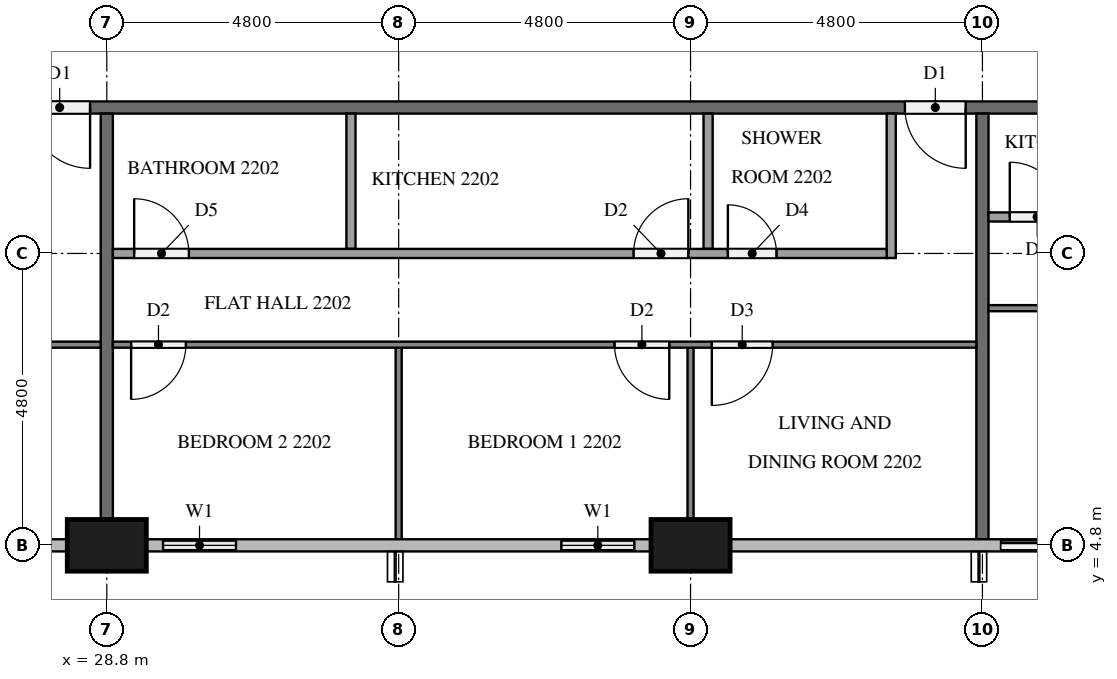
"""IFC4 building model, lengths in metres.
Left out: names, types, materials, properties, quantities, classifications, styles, units other than length and angle.
Written with IfcOpenShell. Run it as: python <this file> out.ifc"""

import sys

from ifc_helpers import new_model, si_unit, direction, frame, frame_2d, origin, origin_2d, place, context, subcontext, project, spatial, rectangle, extrude, element, fill, save


model = new_model("IFC4")
c1 = context("Model", 3, precision=1e-05, world=origin(), true_north=direction((0.0, 1.0)))
c2 = subcontext(c1, "Body", "Model", "MODEL_VIEW")
j1 = project(units=[si_unit("LENGTHUNIT", "METRE"), si_unit("PLANEANGLEUNIT", "RADIAN")], contexts=[c1])
p1 = place(None, origin())
s1 = spatial("IfcSite", under=j1, at=p1, CompositionType="ELEMENT")
p2 = place(p1, origin())
s2 = spatial("IfcBuilding", under=s1, at=p2, CompositionType="ELEMENT")
p3 = place(p2, frame((0.0, 0.0, 89.2)))
s3 = spatial("IfcBuildingStorey", under=s2, at=p3, CompositionType="ELEMENT", Elevation=89.2)
for number, where, z_axis, x_axis in (
    (1, (28.8, 4.8, 0.0), (0.0, 0.0, 1.0), (1.0, 0.0, 0.0)),
    (2, (38.4, 4.8, 0.0), (0.0, 0.0, 1.0), (1.0, 0.0, 0.0)),
):
    element("IfcColumn", number, at=place(p3, frame(where, z_axis=z_axis, x_axis=x_axis)), inside=s3, PredefinedType="COLUMN", context=c2, shape_type="SweptSolid", body=[
        extrude(rectangle(XDim=1.3, YDim=0.85, at=origin_2d()), origin(), (0.0, 0.0, 1.0), 3.2),
    ])
p4 = place(p3, frame((26.4, 4.8, 0.0), z_axis=(0.0, 0.0, 1.0), x_axis=(1.0, 0.0, 0.0)))
e3 = element("IfcWall", 3, at=p4, inside=s3, PredefinedType="SOLIDWALL", context=c2, shape_type="SweptSolid", body=[
    extrude(rectangle(XDim=1.75, YDim=0.15, at=frame_2d((0.875, 0.0))), origin(), (0.0, 0.0, 1.0), 3.2),
])
p5 = place(p4, frame((0.275, 0.0, 0.9)))
e4 = element("IfcOpeningElement", 4, at=p5, cuts=e3, PredefinedType="OPENING", context=c2, shape_type="SweptSolid", body=[
    extrude(rectangle(XDim=1.2, YDim=1.4, at=frame_2d((0.6, 0.7))), frame((0.0, 0.085, 0.0), z_axis=(0.0, -1.0, 0.0), x_axis=(1.0, 0.0, 0.0)), (0.0, 0.0, 1.0), 0.17),
])
p6 = place(p3, frame((29.45, 4.8, 0.0), z_axis=(0.0, 0.0, 1.0), x_axis=(1.0, 0.0, 0.0)))
e5 = element("IfcWall", 5, at=p6, inside=s3, PredefinedType="SOLIDWALL", context=c2, shape_type="SweptSolid", body=[
    extrude(rectangle(XDim=1.75, YDim=0.15, at=frame_2d((0.875, 0.0))), origin(), (0.0, 0.0, 1.0), 3.2),
])
p7 = place(p6, frame((0.275, 0.0, 0.9)))
e6 = element("IfcOpeningElement", 6, at=p7, cuts=e5, PredefinedType="OPENING", context=c2, shape_type="SweptSolid", body=[
    extrude(rectangle(XDim=1.2, YDim=1.4, at=frame_2d((0.6, 0.7))), frame((0.0, 0.085, 0.0), z_axis=(0.0, -1.0, 0.0), x_axis=(1.0, 0.0, 0.0)), (0.0, 0.0, 1.0), 0.17),
])
p8 = place(p3, frame((36.0, 4.8, 0.0), z_axis=(0.0, 0.0, 1.0), x_axis=(1.0, 0.0, 0.0)))
e7 = element("IfcWall", 7, at=p8, inside=s3, PredefinedType="SOLIDWALL", context=c2, shape_type="SweptSolid", body=[
    extrude(rectangle(XDim=1.75, YDim=0.15, at=frame_2d((0.875, 0.0))), origin(), (0.0, 0.0, 1.0), 3.2),
])
p9 = place(p8, frame((0.275, 0.0, 0.9)))
e8 = element("IfcOpeningElement", 8, at=p9, cuts=e7, PredefinedType="OPENING", context=c2, shape_type="SweptSolid", body=[
    extrude(rectangle(XDim=1.2, YDim=1.4, at=frame_2d((0.6, 0.7))), frame((0.0, 0.085, 0.0), z_axis=(0.0, -1.0, 0.0), x_axis=(1.0, 0.0, 0.0)), (0.0, 0.0, 1.0), 0.17),
])
p10 = place(p3, frame((43.2, 4.8, 0.0), z_axis=(0.0, 0.0, 1.0), x_axis=(1.0, 0.0, 0.0)))
e9 = element("IfcWall", 9, at=p10, inside=s3, PredefinedType="SOLIDWALL", context=c2, shape_type="SweptSolid", body=[
    extrude(rectangle(XDim=2.4, YDim=0.15, at=frame_2d((1.2, 0.0))), origin(), (0.0, 0.0, 1.0), 3.2),
])
p11 = place(p10, frame((0.3, 0.0, 0.0)))
e10 = element("IfcOpeningElement", 10, at=p11, cuts=e9, PredefinedType="OPENING", context=c2, shape_type="SweptSolid", body=[
    extrude(rectangle(XDim=1.8, YDim=2.4, at=frame_2d((0.9, 1.2))), frame((0.0, 0.085, 0.0), z_axis=(0.0, -1.0, 0.0), x_axis=(1.0, 0.0, 0.0)), (0.0, 0.0, 1.0), 0.17),
])
p12 = place(p3, frame((50.5, 12.0, 0.0), z_axis=(0.0, 0.0, 1.0), x_axis=(-1.0, 0.0, 0.0)))
e11 = element("IfcWall", 11, at=p12, inside=s3, PredefinedType="PARTITIONING", context=c2, shape_type="SweptSolid", body=[
    extrude(rectangle(XDim=38.6, YDim=0.2, at=frame_2d((19.3, 0.0))), origin(), (0.0, 0.0, 1.0), 3.2),
])
p13 = place(p12, frame((21.975, 0.0, 0.0)))
e12 = element("IfcOpeningElement", 12, at=p13, cuts=e11, PredefinedType="OPENING", context=c2, shape_type="SweptSolid", body=[
    extrude(rectangle(XDim=1.0, YDim=2.1, at=frame_2d((0.5, 1.05))), frame((0.0, 0.11, 0.0), z_axis=(0.0, -1.0, 0.0), x_axis=(1.0, 0.0, 0.0)), (0.0, 0.0, 1.0), 0.22),
])
p14 = place(p12, frame((7.575, 0.0, 0.0)))
e13 = element("IfcOpeningElement", 13, at=p14, cuts=e11, PredefinedType="OPENING", context=c2, shape_type="SweptSolid", body=[
    extrude(rectangle(XDim=1.0, YDim=2.1, at=frame_2d((0.5, 1.05))), frame((0.0, 0.11, 0.0), z_axis=(0.0, -1.0, 0.0), x_axis=(1.0, 0.0, 0.0)), (0.0, 0.0, 1.0), 0.22),
])
p15 = place(p12, frame((0.375, 0.0, 0.0)))
e14 = element("IfcOpeningElement", 14, at=p15, cuts=e11, PredefinedType="OPENING", context=c2, shape_type="SweptSolid", body=[
    extrude(rectangle(XDim=1.0, YDim=2.1, at=frame_2d((0.5, 1.05))), frame((0.0, 0.11, 0.0), z_axis=(0.0, -1.0, 0.0), x_axis=(1.0, 0.0, 0.0)), (0.0, 0.0, 1.0), 0.22),
])
p16 = place(p3, frame((28.8, 11.9, 0.0), z_axis=(0.0, 0.0, 1.0), x_axis=(0.0, -1.0, 0.0)))
e15 = element("IfcWall", 15, at=p16, inside=s3, PredefinedType="PARTITIONING", context=c2, shape_type="SweptSolid", body=[
    extrude(rectangle(XDim=6.675, YDim=0.2, at=frame_2d((3.337, 0.0))), origin(), (0.0, 0.0, 1.0), 3.2),
])
p17 = place(p3, frame((43.2, 11.9, 0.0), z_axis=(0.0, 0.0, 1.0), x_axis=(0.0, -1.0, 0.0)))
e16 = element("IfcWall", 16, at=p17, inside=s3, PredefinedType="PARTITIONING", context=c2, shape_type="SweptSolid", body=[
    extrude(rectangle(XDim=7.0, YDim=0.2, at=frame_2d((3.5, 0.0))), origin(), (0.0, 0.0, 1.0), 3.2),
])
p18 = place(p3, frame((28.7, 8.1, 0.0), z_axis=(0.0, 0.0, 1.0), x_axis=(-1.0, 0.0, 0.0)))
e17 = element("IfcWall", 17, at=p18, inside=s3, PredefinedType="PARTITIONING", context=c2, shape_type="SweptSolid", body=[
    extrude(rectangle(XDim=16.6, YDim=0.1, at=frame_2d((8.3, 0.0))), origin(), (0.0, 0.0, 1.0), 3.2),
])
p19 = place(p18, frame((3.45, 0.0, 0.0)))
e18 = element("IfcOpeningElement", 18, at=p19, cuts=e17, PredefinedType="OPENING", context=c2, shape_type="SweptSolid", body=[
    extrude(rectangle(XDim=0.9, YDim=2.1, at=frame_2d((0.45, 1.05))), frame((0.0, 0.06, 0.0), z_axis=(0.0, -1.0, 0.0), x_axis=(1.0, 0.0, 0.0)), (0.0, 0.0, 1.0), 0.12),
])
p20 = place(p18, frame((5.05, 0.0, 0.0)))
e19 = element("IfcOpeningElement", 19, at=p20, cuts=e17, PredefinedType="OPENING", context=c2, shape_type="SweptSolid", body=[
    extrude(rectangle(XDim=1.0, YDim=2.1, at=frame_2d((0.5, 1.05))), frame((0.0, 0.06, 0.0), z_axis=(0.0, -1.0, 0.0), x_axis=(1.0, 0.0, 0.0)), (0.0, 0.0, 1.0), 0.12),
])
p21 = place(p18, frame((15.4, 0.0, 0.0)))
e20 = element("IfcOpeningElement", 20, at=p21, cuts=e17, PredefinedType="OPENING", context=c2, shape_type="SweptSolid", body=[
    extrude(rectangle(XDim=0.9, YDim=2.1, at=frame_2d((0.45, 1.05))), frame((0.0, 0.06, 0.0), z_axis=(0.0, -1.0, 0.0), x_axis=(1.0, 0.0, 0.0)), (0.0, 0.0, 1.0), 0.12),
])
p22 = place(p3, frame((38.4, 8.05, 0.0), z_axis=(0.0, 0.0, 1.0), x_axis=(0.0, -1.0, 0.0)))
e21 = element("IfcWall", 21, at=p22, inside=s3, PredefinedType="PARTITIONING", context=c2, shape_type="SweptSolid", body=[
    extrude(rectangle(XDim=2.825, YDim=0.1, at=frame_2d((1.413, 0.0))), origin(), (0.0, 0.0, 1.0), 3.2),
])
p23 = place(p3, frame((33.6, 8.05, 0.0), z_axis=(0.0, 0.0, 1.0), x_axis=(0.0, -1.0, 0.0)))
e22 = element("IfcWall", 22, at=p23, inside=s3, PredefinedType="PARTITIONING", context=c2, shape_type="SweptSolid", body=[
    extrude(rectangle(XDim=3.15, YDim=0.1, at=frame_2d((1.575, 0.0))), origin(), (0.0, 0.0, 1.0), 3.2),
])
p24 = place(p3, frame((43.1, 8.1, 0.0), z_axis=(0.0, 0.0, 1.0), x_axis=(-1.0, 0.0, 0.0)))
e23 = element("IfcWall", 23, at=p24, inside=s3, PredefinedType="PARTITIONING", context=c2, shape_type="SweptSolid", body=[
    extrude(rectangle(XDim=14.2, YDim=0.1, at=frame_2d((7.1, 0.0))), origin(), (0.0, 0.0, 1.0), 3.2),
])
p25 = place(p24, frame((3.35, 0.0, 0.0)))
e24 = element("IfcOpeningElement", 24, at=p25, cuts=e23, PredefinedType="OPENING", context=c2, shape_type="SweptSolid", body=[
    extrude(rectangle(XDim=1.0, YDim=2.1, at=frame_2d((0.5, 1.05))), frame((0.0, 0.06, 0.0), z_axis=(0.0, -1.0, 0.0), x_axis=(1.0, 0.0, 0.0)), (0.0, 0.0, 1.0), 0.12),
])
p26 = place(p24, frame((5.05, 0.0, 0.0)))
e25 = element("IfcOpeningElement", 25, at=p26, cuts=e23, PredefinedType="OPENING", context=c2, shape_type="SweptSolid", body=[
    extrude(rectangle(XDim=0.9, YDim=2.1, at=frame_2d((0.45, 1.05))), frame((0.0, 0.06, 0.0), z_axis=(0.0, -1.0, 0.0), x_axis=(1.0, 0.0, 0.0)), (0.0, 0.0, 1.0), 0.12),
])
p27 = place(p24, frame((13.0, 0.0, 0.0)))
e26 = element("IfcOpeningElement", 26, at=p27, cuts=e23, PredefinedType="OPENING", context=c2, shape_type="SweptSolid", body=[
    extrude(rectangle(XDim=0.9, YDim=2.1, at=frame_2d((0.45, 1.05))), frame((0.0, 0.06, 0.0), z_axis=(0.0, -1.0, 0.0), x_axis=(1.0, 0.0, 0.0)), (0.0, 0.0, 1.0), 0.12),
])
for number, where, z_axis, x_axis in (
    (27, (38.688, 11.9, 0.0), (0.0, 0.0, 1.0), (0.0, -1.0, 0.0)),
    (28, (32.815, 11.9, 0.0), (0.0, 0.0, 1.0), (0.0, -1.0, 0.0)),
):
    element("IfcWall", number, at=place(p3, frame(where, z_axis=z_axis, x_axis=x_axis)), inside=s3, PredefinedType="PARTITIONING", context=c2, shape_type="SweptSolid", body=[
        extrude(rectangle(XDim=2.225, YDim=0.15, at=frame_2d((1.112, 0.0))), origin(), (0.0, 0.0, 1.0), 3.2),
    ])
p28 = place(p3, frame((41.7, 11.9, 0.0), z_axis=(0.0, 0.0, 1.0), x_axis=(0.0, -1.0, 0.0)))
e29 = element("IfcWall", 29, at=p28, inside=s3, PredefinedType="PARTITIONING", context=c2, shape_type="SweptSolid", body=[
    extrude(rectangle(XDim=2.375, YDim=0.15, at=frame_2d((1.188, 0.0))), origin(), (0.0, 0.0, 1.0), 3.2),
])
p29 = place(p3, frame((28.9, 9.6, 0.0), z_axis=(0.0, 0.0, 1.0), x_axis=(1.0, 0.0, 0.0)))
e30 = element("IfcWall", 30, at=p29, inside=s3, PredefinedType="PARTITIONING", context=c2, shape_type="SweptSolid", body=[
    extrude(rectangle(XDim=12.725, YDim=0.15, at=frame_2d((6.363, 0.0))), origin(), (0.0, 0.0, 1.0), 3.2),
])
p30 = place(p29, frame((10.114, 0.0, 0.0)))
e31 = element("IfcOpeningElement", 31, at=p30, cuts=e30, PredefinedType="OPENING", context=c2, shape_type="SweptSolid", body=[
    extrude(rectangle(XDim=0.8, YDim=2.1, at=frame_2d((0.4, 1.05))), frame((0.0, 0.085, 0.0), z_axis=(0.0, -1.0, 0.0), x_axis=(1.0, 0.0, 0.0)), (0.0, 0.0, 1.0), 0.17),
])
p31 = place(p29, frame((8.563, 0.0, 0.0)))
e32 = element("IfcOpeningElement", 32, at=p31, cuts=e30, PredefinedType="OPENING", context=c2, shape_type="SweptSolid", body=[
    extrude(rectangle(XDim=0.9, YDim=2.1, at=frame_2d((0.45, 1.05))), frame((0.0, 0.085, 0.0), z_axis=(0.0, -1.0, 0.0), x_axis=(1.0, 0.0, 0.0)), (0.0, 0.0, 1.0), 0.17),
])
p32 = place(p29, frame((0.35, 0.0, 0.0)))
e33 = element("IfcOpeningElement", 33, at=p32, cuts=e30, PredefinedType="OPENING", context=c2, shape_type="SweptSolid", body=[
    extrude(rectangle(XDim=0.9, YDim=2.1, at=frame_2d((0.45, 1.05))), frame((0.0, 0.085, 0.0), z_axis=(0.0, -1.0, 0.0), x_axis=(1.0, 0.0, 0.0)), (0.0, 0.0, 1.0), 0.17),
])
p33 = place(p3, frame((50.3, 8.7, 0.0), z_axis=(0.0, 0.0, 1.0), x_axis=(-1.0, 0.0, 0.0)))
e34 = element("IfcWall", 34, at=p33, inside=s3, PredefinedType="PARTITIONING", context=c2, shape_type="SweptSolid", body=[
    extrude(rectangle(XDim=7.0, YDim=0.1, at=frame_2d((3.5, 0.0))), origin(), (0.0, 0.0, 1.0), 3.2),
])
p34 = place(p33, frame((0.3, 0.0, 0.0)))
e35 = element("IfcOpeningElement", 35, at=p34, cuts=e34, PredefinedType="OPENING", context=c2, shape_type="SweptSolid", body=[
    extrude(rectangle(XDim=1.0, YDim=2.1, at=frame_2d((0.5, 1.05))), frame((0.0, 0.06, 0.0), z_axis=(0.0, -1.0, 0.0), x_axis=(1.0, 0.0, 0.0)), (0.0, 0.0, 1.0), 0.12),
])
p35 = place(p3, frame((43.3, 10.2, 0.0), z_axis=(0.0, 0.0, 1.0), x_axis=(1.0, 0.0, 0.0)))
e36 = element("IfcWall", 36, at=p35, inside=s3, PredefinedType="PARTITIONING", context=c2, shape_type="SweptSolid", body=[
    extrude(rectangle(XDim=5.525, YDim=0.15, at=frame_2d((2.762, 0.0))), origin(), (0.0, 0.0, 1.0), 3.2),
])
p36 = place(p35, frame((4.425, 0.0, 0.0)))
e37 = element("IfcOpeningElement", 37, at=p36, cuts=e36, PredefinedType="OPENING", context=c2, shape_type="SweptSolid", body=[
    extrude(rectangle(XDim=0.8, YDim=2.1, at=frame_2d((0.4, 1.05))), frame((0.0, 0.085, 0.0), z_axis=(0.0, -1.0, 0.0), x_axis=(1.0, 0.0, 0.0)), (0.0, 0.0, 1.0), 0.17),
])
p37 = place(p35, frame((0.35, 0.0, 0.0)))
e38 = element("IfcOpeningElement", 38, at=p37, cuts=e36, PredefinedType="OPENING", context=c2, shape_type="SweptSolid", body=[
    extrude(rectangle(XDim=0.9, YDim=2.1, at=frame_2d((0.45, 1.05))), frame((0.0, 0.085, 0.0), z_axis=(0.0, -1.0, 0.0), x_axis=(1.0, 0.0, 0.0)), (0.0, 0.0, 1.0), 0.17),
])
p38 = place(p7, origin())
e39 = element("IfcWindow", 39, at=p38, inside=s3, PartitioningType="SINGLE_PANEL", PredefinedType="WINDOW", context=c2, shape_type="SweptSolid", body=[
    extrude(rectangle(XDim=1.2, YDim=1.4, at=frame_2d((0.6, 0.7))), frame((0.0, 0.03, 0.0), z_axis=(0.0, -1.0, 0.0), x_axis=(1.0, 0.0, 0.0)), (0.0, 0.0, 1.0), 0.06),
])
fill(e6, e39)
p39 = place(p9, origin())
e40 = element("IfcWindow", 40, at=p39, inside=s3, PartitioningType="SINGLE_PANEL", PredefinedType="WINDOW", context=c2, shape_type="SweptSolid", body=[
    extrude(rectangle(XDim=1.2, YDim=1.4, at=frame_2d((0.6, 0.7))), frame((0.0, 0.03, 0.0), z_axis=(0.0, -1.0, 0.0), x_axis=(1.0, 0.0, 0.0)), (0.0, 0.0, 1.0), 0.06),
])
fill(e8, e40)
p40 = place(p11, origin())
e41 = element("IfcDoor", 41, at=p40, inside=s3, OperationType="SLIDING_TO_LEFT", PredefinedType="DOOR", context=c2, shape_type="SweptSolid", body=[
    extrude(rectangle(XDim=1.8, YDim=2.4, at=frame_2d((0.9, 1.2))), frame((0.0, 0.025, 0.0), z_axis=(0.0, -1.0, 0.0), x_axis=(1.0, 0.0, 0.0)), (0.0, 0.0, 1.0), 0.05),
])
fill(e10, e41)
p41 = place(p13, origin())
e42 = element("IfcDoor", 42, at=p41, inside=s3, OperationType="SINGLE_SWING_LEFT", PredefinedType="DOOR", context=c2, shape_type="SweptSolid", body=[
    extrude(rectangle(XDim=1.0, YDim=2.1, at=frame_2d((0.5, 1.05))), frame((0.0, 0.025, 0.0), z_axis=(0.0, -1.0, 0.0), x_axis=(1.0, 0.0, 0.0)), (0.0, 0.0, 1.0), 0.05),
])
fill(e12, e42)
p42 = place(p14, origin())
e43 = element("IfcDoor", 43, at=p42, inside=s3, OperationType="SINGLE_SWING_LEFT", PredefinedType="DOOR", context=c2, shape_type="SweptSolid", body=[
    extrude(rectangle(XDim=1.0, YDim=2.1, at=frame_2d((0.5, 1.05))), frame((0.0, 0.025, 0.0), z_axis=(0.0, -1.0, 0.0), x_axis=(1.0, 0.0, 0.0)), (0.0, 0.0, 1.0), 0.05),
])
fill(e13, e43)
p43 = place(p25, origin())
e44 = element("IfcDoor", 44, at=p43, inside=s3, OperationType="SINGLE_SWING_RIGHT", PredefinedType="DOOR", context=c2, shape_type="SweptSolid", body=[
    extrude(rectangle(XDim=1.0, YDim=2.1, at=frame_2d((0.5, 1.05))), frame((0.0, 0.025, 0.0), z_axis=(0.0, -1.0, 0.0), x_axis=(1.0, 0.0, 0.0)), (0.0, 0.0, 1.0), 0.05),
])
fill(e24, e44)
p44 = place(p26, origin())
e45 = element("IfcDoor", 45, at=p44, inside=s3, OperationType="SINGLE_SWING_LEFT", PredefinedType="DOOR", context=c2, shape_type="SweptSolid", body=[
    extrude(rectangle(XDim=0.9, YDim=2.1, at=frame_2d((0.45, 1.05))), frame((0.0, 0.025, 0.0), z_axis=(0.0, -1.0, 0.0), x_axis=(1.0, 0.0, 0.0)), (0.0, 0.0, 1.0), 0.05),
])
fill(e25, e45)
p45 = place(p27, origin())
e46 = element("IfcDoor", 46, at=p45, inside=s3, OperationType="SINGLE_SWING_RIGHT", PredefinedType="DOOR", context=c2, shape_type="SweptSolid", body=[
    extrude(rectangle(XDim=0.9, YDim=2.1, at=frame_2d((0.45, 1.05))), frame((0.0, 0.025, 0.0), z_axis=(0.0, -1.0, 0.0), x_axis=(1.0, 0.0, 0.0)), (0.0, 0.0, 1.0), 0.05),
])
fill(e26, e46)
p46 = place(p30, origin())
e47 = element("IfcDoor", 47, at=p46, inside=s3, OperationType="SINGLE_SWING_LEFT", PredefinedType="DOOR", context=c2, shape_type="SweptSolid", body=[
    extrude(rectangle(XDim=0.8, YDim=2.1, at=frame_2d((0.4, 1.05))), frame((0.0, 0.025, 0.0), z_axis=(0.0, -1.0, 0.0), x_axis=(1.0, 0.0, 0.0)), (0.0, 0.0, 1.0), 0.05),
])
fill(e31, e47)
p47 = place(p31, origin())
e48 = element("IfcDoor", 48, at=p47, inside=s3, OperationType="SINGLE_SWING_RIGHT", PredefinedType="DOOR", context=c2, shape_type="SweptSolid", body=[
    extrude(rectangle(XDim=0.9, YDim=2.1, at=frame_2d((0.45, 1.05))), frame((0.0, 0.025, 0.0), z_axis=(0.0, -1.0, 0.0), x_axis=(1.0, 0.0, 0.0)), (0.0, 0.0, 1.0), 0.05),
])
fill(e32, e48)
p48 = place(p32, origin())
e49 = element("IfcDoor", 49, at=p48, inside=s3, OperationType="SINGLE_SWING_LEFT", PredefinedType="DOOR", context=c2, shape_type="SweptSolid", body=[
    extrude(rectangle(XDim=0.9, YDim=2.1, at=frame_2d((0.45, 1.05))), frame((0.0, 0.025, 0.0), z_axis=(0.0, -1.0, 0.0), x_axis=(1.0, 0.0, 0.0)), (0.0, 0.0, 1.0), 0.05),
])
fill(e33, e49)
p49 = place(p37, origin())
e50 = element("IfcDoor", 50, at=p49, inside=s3, OperationType="SINGLE_SWING_LEFT", PredefinedType="DOOR", context=c2, shape_type="SweptSolid", body=[
    extrude(rectangle(XDim=0.9, YDim=2.1, at=frame_2d((0.45, 1.05))), frame((0.0, 0.025, 0.0), z_axis=(0.0, -1.0, 0.0), x_axis=(1.0, 0.0, 0.0)), (0.0, 0.0, 1.0), 0.05),
])
fill(e38, e50)
save(model, sys.argv[1])
